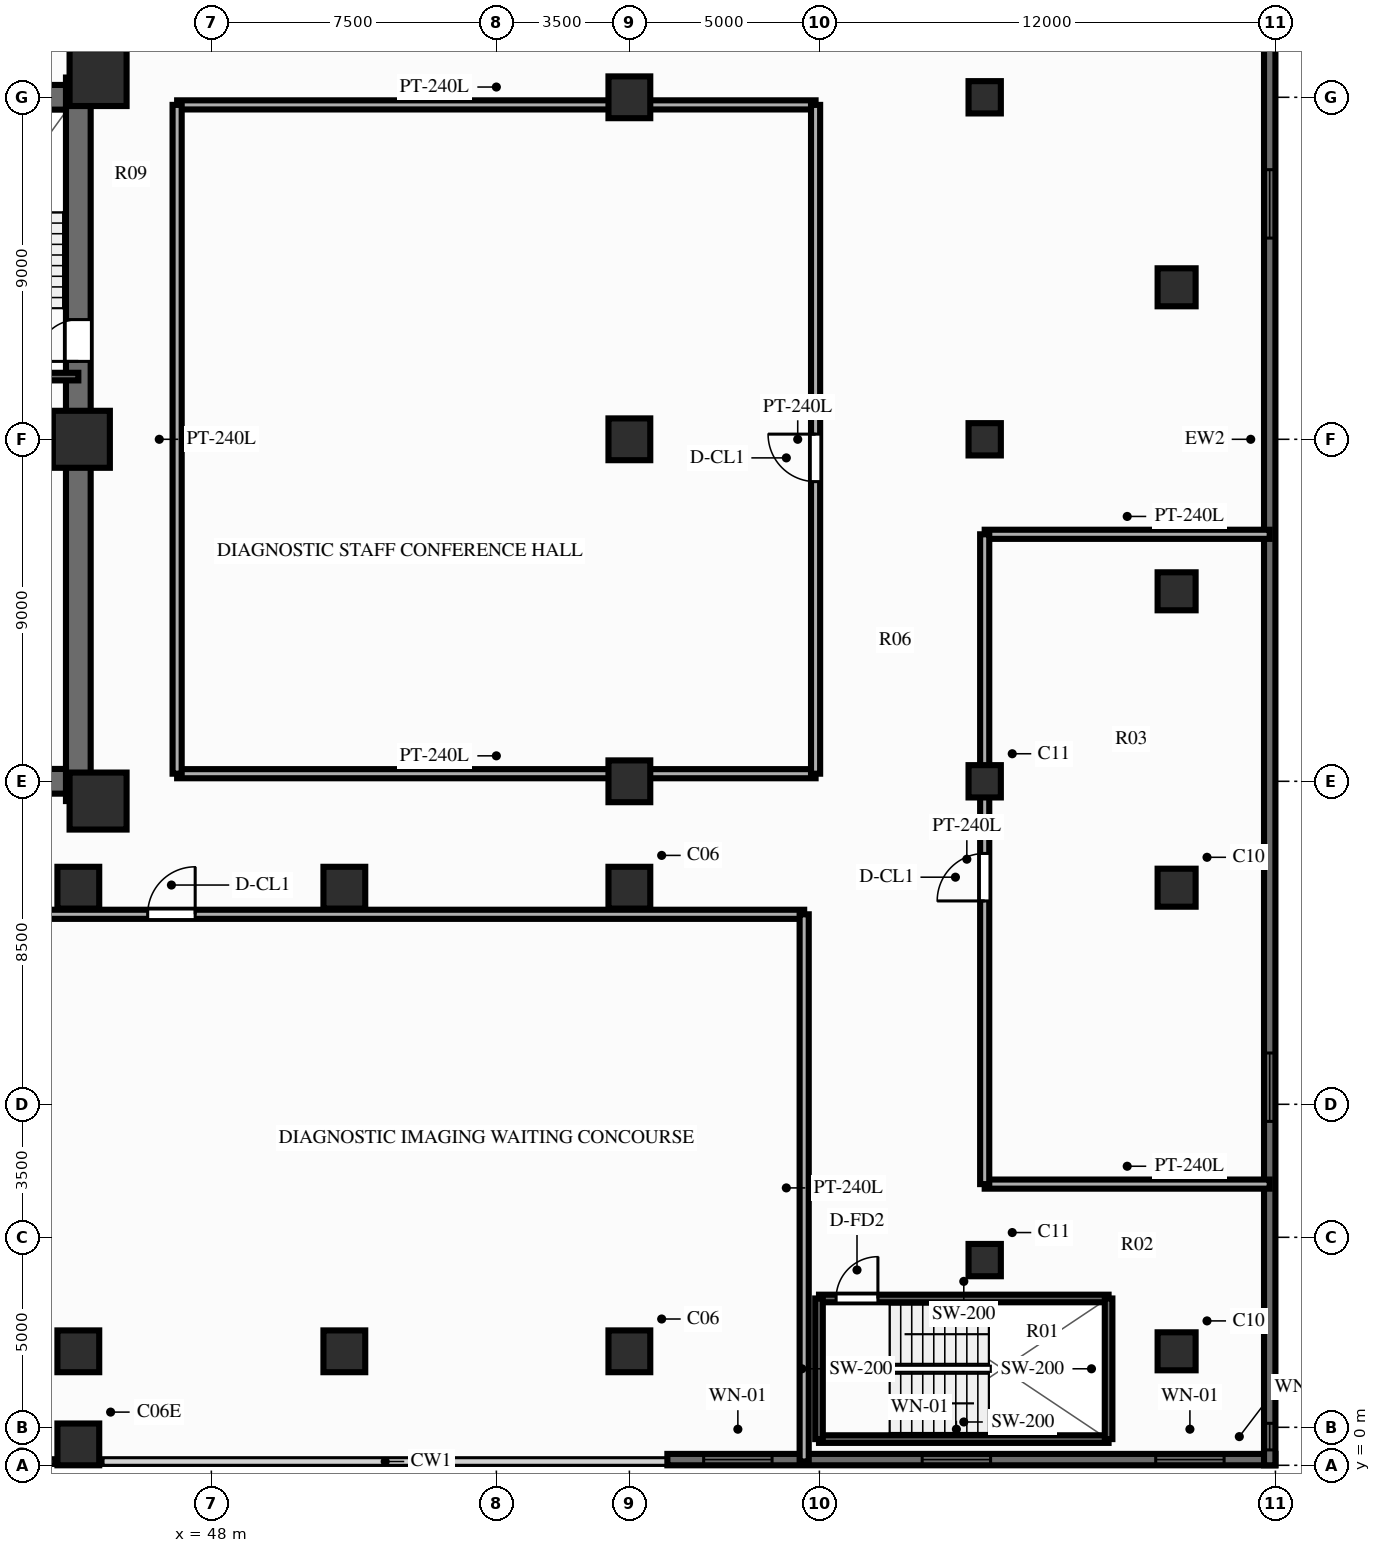
"""IFC4 building model, lengths in metres.
Left out: names, types, materials, properties, quantities, classifications, styles, units other than length and angle.
Written with IfcOpenShell. Run it as: python <this file> out.ifc"""

import sys

from ifc_helpers import new_model, si_unit, direction, frame, frame_2d, origin, origin_2d, place, context, subcontext, project, spatial, rectangle, circle, extrude, source, transform, mapped, element, fill, save


model = new_model("IFC4")
c1 = context("Model", 3, precision=1e-05, world=origin(), true_north=direction((0.0, 1.0)))
c2 = subcontext(c1, "Body", "Model", "MODEL_VIEW")
j1 = project(units=[si_unit("LENGTHUNIT", "METRE"), si_unit("PLANEANGLEUNIT", "RADIAN")], contexts=[c1])
p1 = place(None, origin())
s1 = spatial("IfcSite", under=j1, at=p1, CompositionType="ELEMENT")
p2 = place(p1, origin())
s2 = spatial("IfcBuilding", under=s1, at=p2, CompositionType="ELEMENT")
p3 = place(p2, frame((0.0, 0.0, 7.8)))
s3 = spatial("IfcBuildingStorey", under=s2, at=p3, CompositionType="ELEMENT", Elevation=7.8)
p4 = place(p3, frame((44.5, 17.48, 0.0), z_axis=(0.0, 0.0, 1.0), x_axis=(0.0, 1.0, 0.0)))
e1 = element("IfcWall", 1, at=p4, inside=s3, PredefinedType="SHEAR", context=c2, shape_type="SweptSolid", body=[
    extrude(rectangle(XDim=19.04, YDim=0.65, at=frame_2d((9.52, 0.0))), origin(), (0.0, 0.0, 1.0), 3.6),
])
p5 = place(p4, frame((12.67, 0.0, 0.0), z_axis=(0.0, 0.0, 1.0), x_axis=(-1.0, 0.0, 0.0)))
e2 = element("IfcOpeningElement", 2, at=p5, cuts=e1, PredefinedType="OPENING", context=c2, shape_type="SweptSolid", body=[
    extrude(rectangle(XDim=1.1, YDim=2.15, at=frame_2d((0.55, 1.075))), frame((0.0, 0.337, 0.0), z_axis=(0.0, -1.0, 0.0), x_axis=(1.0, 0.0, 0.0)), (0.0, 0.0, 1.0), 0.674),
])
p6 = place(p3, frame((31.825, 18.0, 0.0), z_axis=(0.0, 0.0, 1.0), x_axis=(1.0, 0.0, 0.0)))
e3 = element("IfcWall", 3, at=p6, inside=s3, PredefinedType="SHEAR", context=c2, shape_type="SweptSolid", body=[
    extrude(rectangle(XDim=12.35, YDim=0.65, at=frame_2d((6.175, 0.0))), origin(), (0.0, 0.0, 1.0), 3.6),
])
p7 = place(p3, frame((31.825, 36.0, 0.0), z_axis=(0.0, 0.0, 1.0), x_axis=(1.0, 0.0, 0.0)))
e4 = element("IfcWall", 4, at=p7, inside=s3, PredefinedType="SHEAR", context=c2, shape_type="SweptSolid", body=[
    extrude(rectangle(XDim=12.35, YDim=0.65, at=frame_2d((6.175, 0.0))), origin(), (0.0, 0.0, 1.0), 3.6),
])
p8 = place(p7, frame((5.125, 0.0, 0.0), z_axis=(0.0, 0.0, 1.0), x_axis=(-1.0, 0.0, 0.0)))
e5 = element("IfcOpeningElement", 5, at=p8, cuts=e4, PredefinedType="OPENING", context=c2, shape_type="SweptSolid", body=[
    extrude(rectangle(XDim=1.4, YDim=2.15, at=frame_2d((0.7, 1.075))), frame((0.0, 0.337, 0.0), z_axis=(0.0, -1.0, 0.0), x_axis=(1.0, 0.0, 0.0)), (0.0, 0.0, 1.0), 0.674),
])
m1 = source(origin(), c2, "Body", "SweptSolid", [
    extrude(rectangle(XDim=1.5, YDim=1.5, at=origin_2d()), origin(), (0.0, 0.0, 1.0), 3.6),
])
for number, where, z_axis, x_axis in (
    (6, (45.02, 17.48, 0.0), (0.0, 0.0, 1.0), (1.0, 0.0, 0.0)),
    (7, (45.02, 36.52, 0.0), (0.0, 0.0, 1.0), (1.0, 0.0, 0.0)),
    (8, (44.58, 27.0, 0.0), (0.0, 0.0, 1.0), (1.0, 0.0, 0.0)),
):
    element("IfcColumn", number, at=place(p3, frame(where, z_axis=z_axis, x_axis=x_axis)), inside=s3, PredefinedType="COLUMN", context=c2, shape_type="MappedRepresentation", body=[
        mapped(m1, transform((0.0, 0.0, 0.0), scale=1.0)),
    ])
m2 = source(origin(), c2, "Body", "SweptSolid", [
    extrude(circle(Radius=0.5, at=origin_2d()), origin(), (0.0, 0.0, 1.0), 3.6),
])
for number, where, z_axis, x_axis in (
    (9, (73.4, 3.0, 0.0), (0.0, 0.0, 1.0), (1.0, 0.0, 0.0)),
    (10, (73.4, 15.2, 0.0), (0.0, 0.0, 1.0), (1.0, 0.0, 0.0)),
    (11, (73.4, 23.0, 0.0), (0.0, 0.0, 1.0), (1.0, 0.0, 0.0)),
    (12, (73.4, 31.0, 0.0), (0.0, 0.0, 1.0), (1.0, 0.0, 0.0)),
):
    element("IfcColumn", number, at=place(p3, frame(where, z_axis=z_axis, x_axis=x_axis)), inside=s3, PredefinedType="COLUMN", context=c2, shape_type="MappedRepresentation", body=[
        mapped(m2, transform((0.0, 0.0, 0.0), scale=1.0)),
    ])
m3 = source(origin(), c2, "Body", "SweptSolid", [
    extrude(circle(Radius=0.425, at=origin_2d()), origin(), (0.0, 0.0, 1.0), 3.6),
])
for number, where, z_axis, x_axis in (
    (13, (68.35, 5.4, 0.0), (0.0, 0.0, 1.0), (1.0, 0.0, 0.0)),
    (14, (68.35, 18.0, 0.0), (0.0, 0.0, 1.0), (1.0, 0.0, 0.0)),
    (15, (68.35, 27.0, 0.0), (0.0, 0.0, 1.0), (1.0, 0.0, 0.0)),
    (16, (68.35, 36.0, 0.0), (0.0, 0.0, 1.0), (1.0, 0.0, 0.0)),
):
    element("IfcColumn", number, at=place(p3, frame(where, z_axis=z_axis, x_axis=x_axis)), inside=s3, PredefinedType="COLUMN", context=c2, shape_type="MappedRepresentation", body=[
        mapped(m3, transform((0.0, 0.0, 0.0), scale=1.0)),
    ])
m4 = source(origin(), c2, "Body", "SweptSolid", [
    extrude(rectangle(XDim=1.1, YDim=1.1, at=origin_2d()), origin(), (0.0, 0.0, 1.0), 3.6),
])
for number, where, z_axis, x_axis in (
    (17, (59.0, 3.0, 0.0), (0.0, 0.0, 1.0), (1.0, 0.0, 0.0)),
    (18, (59.0, 15.2, 0.0), (0.0, 0.0, 1.0), (1.0, 0.0, 0.0)),
    (19, (59.0, 18.0, 0.0), (0.0, 0.0, 1.0), (1.0, 0.0, 0.0)),
    (20, (59.0, 27.0, 0.0), (0.0, 0.0, 1.0), (1.0, 0.0, 0.0)),
    (21, (59.0, 36.0, 0.0), (0.0, 0.0, 1.0), (1.0, 0.0, 0.0)),
    (22, (44.5, 0.55, 0.0), (0.0, 0.0, 1.0), (1.0, 0.0, 0.0)),
    (23, (44.5, 3.0, 0.0), (0.0, 0.0, 1.0), (1.0, 0.0, 0.0)),
    (24, (44.5, 15.2, 0.0), (0.0, 0.0, 1.0), (1.0, 0.0, 0.0)),
    (25, (51.5, 3.0, 0.0), (0.0, 0.0, 1.0), (1.0, 0.0, 0.0)),
    (26, (51.5, 15.2, 0.0), (0.0, 0.0, 1.0), (1.0, 0.0, 0.0)),
):
    element("IfcColumn", number, at=place(p3, frame(where, z_axis=z_axis, x_axis=x_axis)), inside=s3, PredefinedType="COLUMN", context=c2, shape_type="MappedRepresentation", body=[
        mapped(m4, transform((0.0, 0.0, 0.0), scale=1.0)),
    ])
p9 = place(p3, frame((60.0, 0.15, 0.0), z_axis=(0.0, 0.0, 1.0), x_axis=(1.0, 0.0, 0.0)))
e27 = element("IfcWall", 27, at=p9, inside=s3, PredefinedType="SOLIDWALL", context=c2, shape_type="SweptSolid", body=[
    extrude(rectangle(XDim=16.0, YDim=0.3, at=frame_2d((8.0, 0.0))), origin(), (0.0, 0.0, 1.0), 2.88),
])
p10 = place(p9, frame((0.955, 0.0, 0.85)))
e28 = element("IfcOpeningElement", 28, at=p10, cuts=e27, PredefinedType="OPENING", context=c2, shape_type="SweptSolid", body=[
    extrude(rectangle(XDim=1.8, YDim=1.65, at=frame_2d((0.9, 0.825))), frame((0.0, 0.162, 0.0), z_axis=(0.0, -1.0, 0.0), x_axis=(1.0, 0.0, 0.0)), (0.0, 0.0, 1.0), 0.324),
])
p11 = place(p9, frame((6.705, 0.0, 0.85)))
e29 = element("IfcOpeningElement", 29, at=p11, cuts=e27, PredefinedType="OPENING", context=c2, shape_type="SweptSolid", body=[
    extrude(rectangle(XDim=1.8, YDim=1.65, at=frame_2d((0.9, 0.825))), frame((0.0, 0.162, 0.0), z_axis=(0.0, -1.0, 0.0), x_axis=(1.0, 0.0, 0.0)), (0.0, 0.0, 1.0), 0.324),
])
p12 = place(p9, frame((12.85, 0.0, 0.85)))
e30 = element("IfcOpeningElement", 30, at=p12, cuts=e27, PredefinedType="OPENING", context=c2, shape_type="SweptSolid", body=[
    extrude(rectangle(XDim=1.8, YDim=1.65, at=frame_2d((0.9, 0.825))), frame((0.0, 0.162, 0.0), z_axis=(0.0, -1.0, 0.0), x_axis=(1.0, 0.0, 0.0)), (0.0, 0.0, 1.0), 0.324),
])
p13 = place(p3, frame((75.85, 0.0, 0.0), z_axis=(0.0, 0.0, 1.0), x_axis=(0.0, 1.0, 0.0)))
e31 = element("IfcWall", 31, at=p13, inside=s3, PredefinedType="SOLIDWALL", context=c2, shape_type="SweptSolid", body=[
    extrude(rectangle(XDim=54.0, YDim=0.3, at=frame_2d((27.0, 0.0))), origin(), (0.0, 0.0, 1.0), 2.88),
])
p14 = place(p13, frame((0.405, 0.0, 0.85)))
e32 = element("IfcOpeningElement", 32, at=p14, cuts=e31, PredefinedType="OPENING", context=c2, shape_type="SweptSolid", body=[
    extrude(rectangle(XDim=0.7, YDim=1.5, at=frame_2d((0.35, 0.75))), frame((0.0, 0.162, 0.0), z_axis=(0.0, -1.0, 0.0), x_axis=(1.0, 0.0, 0.0)), (0.0, 0.0, 1.0), 0.324),
])
p15 = place(p13, frame((9.05, 0.0, 0.85)))
e33 = element("IfcOpeningElement", 33, at=p15, cuts=e31, PredefinedType="OPENING", context=c2, shape_type="SweptSolid", body=[
    extrude(rectangle(XDim=1.8, YDim=1.65, at=frame_2d((0.9, 0.825))), frame((0.0, 0.162, 0.0), z_axis=(0.0, -1.0, 0.0), x_axis=(1.0, 0.0, 0.0)), (0.0, 0.0, 1.0), 0.324),
])
p16 = place(p13, frame((32.295, 0.0, 0.85)))
e34 = element("IfcOpeningElement", 34, at=p16, cuts=e31, PredefinedType="OPENING", context=c2, shape_type="SweptSolid", body=[
    extrude(rectangle(XDim=1.8, YDim=1.65, at=frame_2d((0.9, 0.825))), frame((0.0, 0.162, 0.0), z_axis=(0.0, -1.0, 0.0), x_axis=(1.0, 0.0, 0.0)), (0.0, 0.0, 1.0), 0.324),
])
p17 = place(p3, frame((40.57, 28.65, 0.0), z_axis=(0.0, 0.0, 1.0), x_axis=(1.0, 0.0, 0.0)))
e35 = element("IfcWall", 35, at=p17, inside=s3, PredefinedType="SOLIDWALL", context=c2, shape_type="SweptSolid", body=[
    extrude(rectangle(XDim=3.93, YDim=0.2, at=frame_2d((1.965, 0.0))), origin(), (0.0, 0.0, 1.0), 3.32),
])
p18 = place(p3, frame((63.99, 0.69, 0.0), z_axis=(0.0, 0.0, 1.0), x_axis=(1.0, 0.0, 0.0)))
e36 = element("IfcWall", 36, at=p18, inside=s3, PredefinedType="SOLIDWALL", context=c2, shape_type="SweptSolid", body=[
    extrude(rectangle(XDim=7.62, YDim=0.2, at=frame_2d((3.81, 0.0))), origin(), (0.0, 0.0, 1.0), 3.32),
])
p19 = place(p3, frame((63.99, 4.39, 0.0), z_axis=(0.0, 0.0, 1.0), x_axis=(1.0, 0.0, 0.0)))
e37 = element("IfcWall", 37, at=p19, inside=s3, PredefinedType="SOLIDWALL", context=c2, shape_type="SweptSolid", body=[
    extrude(rectangle(XDim=7.62, YDim=0.2, at=frame_2d((3.81, 0.0))), origin(), (0.0, 0.0, 1.0), 3.32),
])
p20 = place(p19, frame((0.45, 0.0, 0.0)))
e38 = element("IfcOpeningElement", 38, at=p20, cuts=e37, PredefinedType="OPENING", context=c2, shape_type="SweptSolid", body=[
    extrude(rectangle(XDim=1.1, YDim=2.15, at=frame_2d((0.55, 1.075))), frame((0.0, 0.112, 0.0), z_axis=(0.0, -1.0, 0.0), x_axis=(1.0, 0.0, 0.0)), (0.0, 0.0, 1.0), 0.224),
])
for number, where, z_axis, x_axis in (
    (39, (63.99, 0.69, 0.0), (0.0, 0.0, 1.0), (0.0, 1.0, 0.0)),
    (40, (71.61, 0.69, 0.0), (0.0, 0.0, 1.0), (0.0, 1.0, 0.0)),
):
    element("IfcWall", number, at=place(p3, frame(where, z_axis=z_axis, x_axis=x_axis)), inside=s3, PredefinedType="SOLIDWALL", context=c2, shape_type="SweptSolid", body=[
        extrude(rectangle(XDim=3.7, YDim=0.2, at=frame_2d((1.85, 0.0))), origin(), (0.0, 0.0, 1.0), 3.32),
    ])
p21 = place(p3, frame((30.3, 14.5, 0.0), z_axis=(0.0, 0.0, 1.0), x_axis=(1.0, 0.0, 0.0)))
e41 = element("IfcWall", 41, at=p21, inside=s3, PredefinedType="PARTITIONING", context=c2, shape_type="SweptSolid", body=[
    extrude(rectangle(XDim=33.3, YDim=0.24, at=frame_2d((16.65, 0.0))), origin(), (0.0, 0.0, 1.0), 3.32),
])
p22 = place(p21, frame((16.025, 0.0, 0.0)))
e42 = element("IfcOpeningElement", 42, at=p22, cuts=e41, PredefinedType="OPENING", context=c2, shape_type="SweptSolid", body=[
    extrude(rectangle(XDim=1.25, YDim=2.15, at=frame_2d((0.625, 1.075))), frame((0.0, 0.132, 0.0), z_axis=(0.0, -1.0, 0.0), x_axis=(1.0, 0.0, 0.0)), (0.0, 0.0, 1.0), 0.264),
])
p23 = place(p3, frame((63.6, 0.1, 0.0), z_axis=(0.0, 0.0, 1.0), x_axis=(0.0, 1.0, 0.0)))
e43 = element("IfcWall", 43, at=p23, inside=s3, PredefinedType="PARTITIONING", context=c2, shape_type="SweptSolid", body=[
    extrude(rectangle(XDim=14.4, YDim=0.24, at=frame_2d((7.2, 0.0))), origin(), (0.0, 0.0, 1.0), 3.32),
])
for number, where, z_axis, x_axis in (
    (44, (68.35, 7.4, 0.0), (0.0, 0.0, 1.0), (1.0, 0.0, 0.0)),
    (45, (68.35, 24.5, 0.0), (0.0, 0.0, 1.0), (1.0, 0.0, 0.0)),
):
    element("IfcWall", number, at=place(p3, frame(where, z_axis=z_axis, x_axis=x_axis)), inside=s3, PredefinedType="PARTITIONING", context=c2, shape_type="SweptSolid", body=[
        extrude(rectangle(XDim=7.5, YDim=0.24, at=frame_2d((3.75, 0.0))), origin(), (0.0, 0.0, 1.0), 3.32),
    ])
p24 = place(p3, frame((68.35, 7.4, 0.0), z_axis=(0.0, 0.0, 1.0), x_axis=(0.0, 1.0, 0.0)))
e46 = element("IfcWall", 46, at=p24, inside=s3, PredefinedType="PARTITIONING", context=c2, shape_type="SweptSolid", body=[
    extrude(rectangle(XDim=17.1, YDim=0.24, at=frame_2d((8.55, 0.0))), origin(), (0.0, 0.0, 1.0), 2.84),
])
p25 = place(p24, frame((7.452, 0.0, 0.0)))
e47 = element("IfcOpeningElement", 47, at=p25, cuts=e46, PredefinedType="OPENING", context=c2, shape_type="SweptSolid", body=[
    extrude(rectangle(XDim=1.25, YDim=2.15, at=frame_2d((0.625, 1.075))), frame((0.0, 0.132, 0.0), z_axis=(0.0, -1.0, 0.0), x_axis=(1.0, 0.0, 0.0)), (0.0, 0.0, 1.0), 0.264),
])
for number, where, z_axis, x_axis in (
    (48, (47.1, 18.2, 0.0), (0.0, 0.0, 1.0), (1.0, 0.0, 0.0)),
    (49, (47.1, 35.8, 0.0), (0.0, 0.0, 1.0), (1.0, 0.0, 0.0)),
):
    element("IfcWall", number, at=place(p3, frame(where, z_axis=z_axis, x_axis=x_axis)), inside=s3, PredefinedType="PARTITIONING", context=c2, shape_type="SweptSolid", body=[
        extrude(rectangle(XDim=16.8, YDim=0.24, at=frame_2d((8.4, 0.0))), origin(), (0.0, 0.0, 1.0), 3.32),
    ])
p26 = place(p3, frame((47.1, 18.2, 0.0), z_axis=(0.0, 0.0, 1.0), x_axis=(0.0, 1.0, 0.0)))
e50 = element("IfcWall", 50, at=p26, inside=s3, PredefinedType="PARTITIONING", context=c2, shape_type="SweptSolid", body=[
    extrude(rectangle(XDim=17.6, YDim=0.24, at=frame_2d((8.8, 0.0))), origin(), (0.0, 0.0, 1.0), 3.32),
])
p27 = place(p3, frame((63.9, 18.2, 0.0), z_axis=(0.0, 0.0, 1.0), x_axis=(0.0, 1.0, 0.0)))
e51 = element("IfcWall", 51, at=p27, inside=s3, PredefinedType="PARTITIONING", context=c2, shape_type="SweptSolid", body=[
    extrude(rectangle(XDim=17.6, YDim=0.24, at=frame_2d((8.8, 0.0))), origin(), (0.0, 0.0, 1.0), 3.32),
])
p28 = place(p27, frame((7.686, 0.0, 0.0)))
e52 = element("IfcOpeningElement", 52, at=p28, cuts=e51, PredefinedType="OPENING", context=c2, shape_type="SweptSolid", body=[
    extrude(rectangle(XDim=1.25, YDim=2.15, at=frame_2d((0.625, 1.075))), frame((0.0, 0.132, 0.0), z_axis=(0.0, -1.0, 0.0), x_axis=(1.0, 0.0, 0.0)), (0.0, 0.0, 1.0), 0.264),
])
m5 = source(origin(), c2, "Body", "SweptSolid", [
    extrude(rectangle(XDim=1.8, YDim=1.65, at=frame_2d((0.9, 0.825))), frame((0.0, 0.03, 0.0), z_axis=(0.0, -1.0, 0.0), x_axis=(1.0, 0.0, 0.0)), (0.0, 0.0, 1.0), 0.06),
])
p29 = place(p10, origin())
e53 = element("IfcWindow", 53, at=p29, inside=s3, PartitioningType="SINGLE_PANEL", PredefinedType="WINDOW", context=c2, shape_type="MappedRepresentation", body=[
    mapped(m5, transform((0.0, 0.0, 0.0), scale=1.0)),
])
fill(e28, e53)
p30 = place(p11, origin())
e54 = element("IfcWindow", 54, at=p30, inside=s3, PartitioningType="SINGLE_PANEL", PredefinedType="WINDOW", context=c2, shape_type="MappedRepresentation", body=[
    mapped(m5, transform((0.0, 0.0, 0.0), scale=1.0)),
])
fill(e29, e54)
p31 = place(p12, origin())
e55 = element("IfcWindow", 55, at=p31, inside=s3, PartitioningType="SINGLE_PANEL", PredefinedType="WINDOW", context=c2, shape_type="MappedRepresentation", body=[
    mapped(m5, transform((0.0, 0.0, 0.0), scale=1.0)),
])
fill(e30, e55)
m6 = source(origin(), c2, "Body", "SweptSolid", [
    extrude(rectangle(XDim=0.7, YDim=1.5, at=frame_2d((0.35, 0.75))), frame((0.0, 0.03, 0.0), z_axis=(0.0, -1.0, 0.0), x_axis=(1.0, 0.0, 0.0)), (0.0, 0.0, 1.0), 0.06),
])
p32 = place(p14, origin())
e56 = element("IfcWindow", 56, at=p32, inside=s3, PartitioningType="SINGLE_PANEL", PredefinedType="WINDOW", context=c2, shape_type="MappedRepresentation", body=[
    mapped(m6, transform((0.0, 0.0, 0.0), scale=1.0)),
])
fill(e32, e56)
p33 = place(p15, origin())
e57 = element("IfcWindow", 57, at=p33, inside=s3, PartitioningType="SINGLE_PANEL", PredefinedType="WINDOW", context=c2, shape_type="MappedRepresentation", body=[
    mapped(m5, transform((0.0, 0.0, 0.0), scale=1.0)),
])
fill(e33, e57)
p34 = place(p16, origin())
e58 = element("IfcWindow", 58, at=p34, inside=s3, PartitioningType="SINGLE_PANEL", PredefinedType="WINDOW", context=c2, shape_type="MappedRepresentation", body=[
    mapped(m5, transform((0.0, 0.0, 0.0), scale=1.0)),
])
fill(e34, e58)
m7 = source(origin(), c2, "Body", "SweptSolid", [
    extrude(rectangle(XDim=1.1, YDim=2.15, at=frame_2d((0.55, 1.075))), frame((0.0, 0.025, 0.0), z_axis=(0.0, -1.0, 0.0), x_axis=(1.0, 0.0, 0.0)), (0.0, 0.0, 1.0), 0.05),
])
p35 = place(p5, origin())
e59 = element("IfcDoor", 59, at=p35, inside=s3, OperationType="SINGLE_SWING_RIGHT", PredefinedType="DOOR", context=c2, shape_type="MappedRepresentation", body=[
    mapped(m7, transform((0.0, 0.0, 0.0), scale=1.0)),
])
fill(e2, e59)
p36 = place(p20, origin())
e60 = element("IfcDoor", 60, at=p36, inside=s3, OperationType="SINGLE_SWING_RIGHT", PredefinedType="DOOR", context=c2, shape_type="MappedRepresentation", body=[
    mapped(m7, transform((0.0, 0.0, 0.0), scale=1.0)),
])
fill(e38, e60)
m8 = source(origin(), c2, "Body", "SweptSolid", [
    extrude(rectangle(XDim=1.25, YDim=2.15, at=frame_2d((0.625, 1.075))), frame((0.0, 0.025, 0.0), z_axis=(0.0, -1.0, 0.0), x_axis=(1.0, 0.0, 0.0)), (0.0, 0.0, 1.0), 0.05),
])
p37 = place(p22, origin())
e61 = element("IfcDoor", 61, at=p37, inside=s3, OperationType="SINGLE_SWING_RIGHT", PredefinedType="DOOR", context=c2, shape_type="MappedRepresentation", body=[
    mapped(m8, transform((0.0, 0.0, 0.0), scale=1.0)),
])
fill(e42, e61)
p38 = place(p25, origin())
e62 = element("IfcDoor", 62, at=p38, inside=s3, OperationType="SINGLE_SWING_LEFT", PredefinedType="DOOR", context=c2, shape_type="MappedRepresentation", body=[
    mapped(m8, transform((0.0, 0.0, 0.0), scale=1.0)),
])
fill(e47, e62)
p39 = place(p28, origin())
e63 = element("IfcDoor", 63, at=p39, inside=s3, OperationType="SINGLE_SWING_RIGHT", PredefinedType="DOOR", context=c2, shape_type="MappedRepresentation", body=[
    mapped(m8, transform((0.0, 0.0, 0.0), scale=1.0)),
])
fill(e52, e63)
save(model, sys.argv[1])
